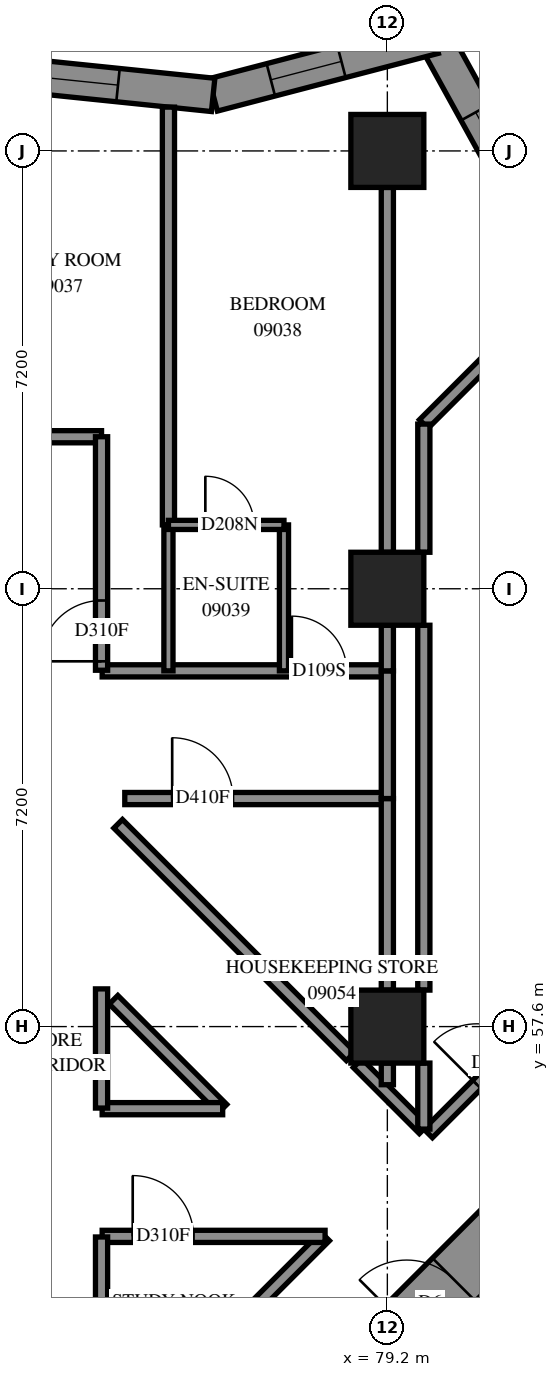
"""IFC4 building model, lengths in metres.
Left out: names, types, materials, properties, quantities, classifications, styles, units other than length and angle.
Written with IfcOpenShell. Run it as: python <this file> out.ifc"""

import sys

from ifc_helpers import new_model, si_unit, direction, frame, frame_2d, origin, origin_2d, place, context, subcontext, project, spatial, polyline, rectangle, outline, extrude, element, fill, save


model = new_model("IFC4")
c1 = context("Model", 3, precision=1e-05, world=origin(), true_north=direction((0.0, 1.0)))
c2 = subcontext(c1, "Body", "Model", "MODEL_VIEW")
j1 = project(units=[si_unit("LENGTHUNIT", "METRE"), si_unit("PLANEANGLEUNIT", "RADIAN")], contexts=[c1])
p1 = place(None, origin())
s1 = spatial("IfcSite", under=j1, at=p1, CompositionType="ELEMENT")
p2 = place(p1, origin())
s2 = spatial("IfcBuilding", under=s1, at=p2, CompositionType="ELEMENT")
p3 = place(p2, frame((0.0, 0.0, 37.2)))
s3 = spatial("IfcBuildingStorey", under=s2, at=p3, CompositionType="ELEMENT", Elevation=37.2)
for number, where, z_axis, x_axis in (
    (1, (79.2, 57.6, 0.0), (0.0, 0.0, 1.0), (1.0, 0.0, 0.0)),
    (2, (79.2, 64.8, 0.0), (0.0, 0.0, 1.0), (1.0, 0.0, 0.0)),
    (3, (79.2, 72.0, 0.0), (0.0, 0.0, 1.0), (1.0, 0.0, 0.0)),
):
    element("IfcColumn", number, at=place(p3, frame(where, z_axis=z_axis, x_axis=x_axis)), inside=s3, PredefinedType="COLUMN", context=c2, shape_type="SweptSolid", body=[
        extrude(rectangle(XDim=1.2, YDim=1.2, at=origin_2d()), origin(), (0.0, 0.0, 1.0), 3.1),
    ])
p4 = place(p3, frame((76.301, 49.443, -0.3), z_axis=(0.0, 0.0, 1.0), x_axis=(0.7071067812, 0.7071067812, 0.0)))
e4 = element("IfcWall", 4, at=p4, inside=s3, PredefinedType="SHEAR", context=c2, shape_type="SweptSolid", body=[
    extrude(rectangle(XDim=14.4, YDim=1.0, at=frame_2d((7.2, 0.0))), origin(), (0.0, 0.0, 1.0), 2.7),
])
p5 = place(p4, frame((4.55, 0.0, 0.3)))
e5 = element("IfcOpeningElement", 5, at=p5, cuts=e4, PredefinedType="OPENING", context=c2, shape_type="SweptSolid", body=[
    extrude(rectangle(XDim=1.1, YDim=2.1, at=frame_2d((0.55, 1.05))), frame((0.0, 0.51, 0.0), z_axis=(0.0, -1.0, 0.0), x_axis=(1.0, 0.0, 0.0)), (0.0, 0.0, 1.0), 1.02),
])
p6 = place(p4, frame((11.35, 0.0, 0.3)))
e6 = element("IfcOpeningElement", 6, at=p6, cuts=e4, PredefinedType="OPENING", context=c2, shape_type="SweptSolid", body=[
    extrude(rectangle(XDim=1.1, YDim=2.1, at=frame_2d((0.55, 1.05))), frame((0.0, 0.51, 0.0), z_axis=(0.0, -1.0, 0.0), x_axis=(1.0, 0.0, 0.0)), (0.0, 0.0, 1.0), 1.02),
])
p7 = place(p3, frame((81.619, 70.883, 0.0), z_axis=(0.0, 0.0, 1.0), x_axis=(-0.4831532481, 0.875535801, 0.0)))
e7 = element("IfcWall", 7, at=p7, inside=s3, PredefinedType="SOLIDWALL", context=c2, shape_type="SweptSolid", body=[
    extrude(outline(polyline([(0.055, -0.275), (3.627, -0.275), (3.199, 0.275), (-0.055, 0.275), (0.055, -0.275)])), origin(), (0.0, 0.0, 1.0), 3.1),
])
p8 = place(p7, frame((0.801, 0.0, 0.5)))
e8 = element("IfcOpeningElement", 8, at=p8, cuts=e7, PredefinedType="OPENING", context=c2, shape_type="SweptSolid", body=[
    extrude(rectangle(XDim=1.2, YDim=2.45, at=frame_2d((0.6, 1.225))), frame((0.0, 0.285, 0.0), z_axis=(0.0, -1.0, 0.0), x_axis=(1.0, 0.0, 0.0)), (0.0, 0.0, 1.0), 0.57),
])
p9 = place(p3, frame((79.97, 73.871, 0.0), z_axis=(0.0, 0.0, 1.0), x_axis=(-0.9675284554, -0.2527621176, 0.0)))
e9 = element("IfcWall", 9, at=p9, inside=s3, PredefinedType="SOLIDWALL", context=c2, shape_type="SweptSolid", body=[
    extrude(outline(polyline([(-0.214, -0.275), (3.707, -0.275), (3.807, 0.275), (0.214, 0.275), (-0.214, -0.275)])), origin(), (0.0, 0.0, 1.0), 3.1),
])
p10 = place(p9, frame((1.576, 0.0, 0.5)))
e10 = element("IfcOpeningElement", 10, at=p10, cuts=e9, PredefinedType="OPENING", context=c2, shape_type="SweptSolid", body=[
    extrude(rectangle(XDim=1.2, YDim=2.45, at=frame_2d((0.6, 1.225))), frame((0.0, 0.285, 0.0), z_axis=(0.0, -1.0, 0.0), x_axis=(1.0, 0.0, 0.0)), (0.0, 0.0, 1.0), 0.57),
])
p11 = place(p3, frame((76.335, 72.921, 0.0), z_axis=(0.0, 0.0, 1.0), x_axis=(-0.9947305582, 0.1025237367, 0.0)))
e11 = element("IfcWall", 11, at=p11, inside=s3, PredefinedType="SOLIDWALL", context=c2, shape_type="SweptSolid", body=[
    extrude(outline(polyline([(0.05, -0.275), (3.864, -0.275), (3.807, 0.275), (-0.05, 0.275), (0.05, -0.275)])), origin(), (0.0, 0.0, 1.0), 3.1),
])
p12 = place(p11, frame((1.573, 0.0, 0.5)))
e12 = element("IfcOpeningElement", 12, at=p12, cuts=e11, PredefinedType="OPENING", context=c2, shape_type="SweptSolid", body=[
    extrude(rectangle(XDim=1.2, YDim=2.45, at=frame_2d((0.6, 1.225))), frame((0.0, 0.285, 0.0), z_axis=(0.0, -1.0, 0.0), x_axis=(1.0, 0.0, 0.0)), (0.0, 0.0, 1.0), 0.57),
])
p13 = place(p3, frame((55.1, 67.3, 0.0), z_axis=(0.0, 0.0, 1.0), x_axis=(1.0, 0.0, 0.0)))
e13 = element("IfcWall", 13, at=p13, inside=s3, PredefinedType="PARTITIONING", context=c2, shape_type="SweptSolid", body=[
    extrude(rectangle(XDim=19.4, YDim=0.2, at=frame_2d((9.7, 0.0))), origin(), (0.0, 0.0, 1.0), 3.1),
])
p14 = place(p13, frame((6.399, 0.0, 0.0)))
e14 = element("IfcOpeningElement", 14, at=p14, cuts=e13, PredefinedType="OPENING", context=c2, shape_type="SweptSolid", body=[
    extrude(rectangle(XDim=0.9, YDim=2.1, at=frame_2d((0.45, 1.05))), frame((0.0, 0.11, 0.0), z_axis=(0.0, -1.0, 0.0), x_axis=(1.0, 0.0, 0.0)), (0.0, 0.0, 1.0), 0.22),
])
p15 = place(p13, frame((13.599, 0.0, 0.0)))
e15 = element("IfcOpeningElement", 15, at=p15, cuts=e13, PredefinedType="OPENING", context=c2, shape_type="SweptSolid", body=[
    extrude(rectangle(XDim=0.9, YDim=2.1, at=frame_2d((0.45, 1.05))), frame((0.0, 0.11, 0.0), z_axis=(0.0, -1.0, 0.0), x_axis=(1.0, 0.0, 0.0)), (0.0, 0.0, 1.0), 0.22),
])
p16 = place(p3, frame((79.871, 55.843, 0.0), z_axis=(0.0, 0.0, 1.0), x_axis=(0.7071067812, 0.7071067812, 0.0)))
e16 = element("IfcWall", 16, at=p16, inside=s3, PredefinedType="PARTITIONING", context=c2, shape_type="SweptSolid", body=[
    extrude(rectangle(XDim=9.85, YDim=0.2, at=frame_2d((4.925, 0.0))), origin(), (0.0, 0.0, 1.0), 3.1),
])
p17 = place(p16, frame((1.135, 0.0, 0.0)))
e17 = element("IfcOpeningElement", 17, at=p17, cuts=e16, PredefinedType="OPENING", context=c2, shape_type="SweptSolid", body=[
    extrude(rectangle(XDim=1.0, YDim=2.1, at=frame_2d((0.5, 1.05))), frame((0.0, 0.11, 0.0), z_axis=(0.0, -1.0, 0.0), x_axis=(1.0, 0.0, 0.0)), (0.0, 0.0, 1.0), 0.22),
])
p18 = place(p3, frame((75.6, 65.85, 0.0), z_axis=(0.0, 0.0, 1.0), x_axis=(0.0, 1.0, 0.0)))
e18 = element("IfcWall", 18, at=p18, inside=s3, PredefinedType="PARTITIONING", context=c2, shape_type="SweptSolid", body=[
    extrude(rectangle(XDim=6.871, YDim=0.2, at=frame_2d((3.435, 0.0))), origin(), (0.0, 0.0, 1.0), 3.1),
])
for number, where, z_axis, x_axis in (
    (19, (79.2, 65.4, 0.0), (0.0, 0.0, 1.0), (0.0, 1.0, 0.0)),
    (20, (79.8, 58.2, 0.0), (0.0, 0.0, 1.0), (0.0, 1.0, 0.0)),
):
    element("IfcWall", number, at=place(p3, frame(where, z_axis=z_axis, x_axis=x_axis)), inside=s3, PredefinedType="PARTITIONING", context=c2, shape_type="SweptSolid", body=[
        extrude(rectangle(XDim=6.0, YDim=0.2, at=frame_2d((3.0, 0.0))), origin(), (0.0, 0.0, 1.0), 3.1),
    ])
p19 = place(p3, frame((74.773, 60.935, 0.0), z_axis=(0.0, 0.0, 1.0), x_axis=(0.7071067812, -0.7071067812, 0.0)))
e21 = element("IfcWall", 21, at=p19, inside=s3, PredefinedType="PARTITIONING", context=c2, shape_type="SweptSolid", body=[
    extrude(rectangle(XDim=5.408, YDim=0.2, at=frame_2d((2.704, 0.0))), origin(), (0.0, 0.0, 1.0), 3.1),
])
p20 = place(p3, frame((74.517, 50.489, 0.0), z_axis=(0.0, 0.0, 1.0), x_axis=(0.7071067812, 0.7071067812, 0.0)))
e22 = element("IfcWall", 22, at=p20, inside=s3, PredefinedType="PARTITIONING", context=c2, shape_type="SweptSolid", body=[
    extrude(rectangle(XDim=5.176, YDim=0.2, at=frame_2d((2.588, 0.0))), origin(), (0.0, 0.0, 1.0), 3.1),
])
p21 = place(p3, frame((74.51, 63.45, 0.0), z_axis=(0.0, 0.0, 1.0), x_axis=(1.0, 0.0, 0.0)))
e23 = element("IfcWall", 23, at=p21, inside=s3, PredefinedType="PARTITIONING", context=c2, shape_type="SweptSolid", body=[
    extrude(rectangle(XDim=4.69, YDim=0.2, at=frame_2d((2.345, 0.0))), origin(), (0.0, 0.0, 1.0), 3.1),
])
p22 = place(p21, frame((3.12, 0.0, 0.0)))
e24 = element("IfcOpeningElement", 24, at=p22, cuts=e23, PredefinedType="OPENING", context=c2, shape_type="SweptSolid", body=[
    extrude(rectangle(XDim=0.9, YDim=2.1, at=frame_2d((0.45, 1.05))), frame((0.0, 0.11, 0.0), z_axis=(0.0, -1.0, 0.0), x_axis=(1.0, 0.0, 0.0)), (0.0, 0.0, 1.0), 0.22),
])
p23 = place(p3, frame((74.882, 61.35, 0.0), z_axis=(0.0, 0.0, 1.0), x_axis=(1.0, 0.0, 0.0)))
e25 = element("IfcWall", 25, at=p23, inside=s3, PredefinedType="PARTITIONING", context=c2, shape_type="SweptSolid", body=[
    extrude(rectangle(XDim=4.318, YDim=0.2, at=frame_2d((2.159, 0.0))), origin(), (0.0, 0.0, 1.0), 3.1),
])
p24 = place(p23, frame((0.78, 0.0, 0.0)))
e26 = element("IfcOpeningElement", 26, at=p24, cuts=e25, PredefinedType="OPENING", context=c2, shape_type="SweptSolid", body=[
    extrude(rectangle(XDim=1.0, YDim=2.1, at=frame_2d((0.5, 1.05))), frame((0.0, 0.11, 0.0), z_axis=(0.0, -1.0, 0.0), x_axis=(1.0, 0.0, 0.0)), (0.0, 0.0, 1.0), 0.22),
])
p25 = place(p3, frame((74.5, 63.46, 0.0), z_axis=(0.0, 0.0, 1.0), x_axis=(0.0, 1.0, 0.0)))
e27 = element("IfcWall", 27, at=p25, inside=s3, PredefinedType="PARTITIONING", context=c2, shape_type="SweptSolid", body=[
    extrude(rectangle(XDim=3.84, YDim=0.2, at=frame_2d((1.92, 0.0))), origin(), (0.0, 0.0, 1.0), 3.1),
])
p26 = place(p25, frame((0.147, 0.0, 0.0)))
e28 = element("IfcOpeningElement", 28, at=p26, cuts=e27, PredefinedType="OPENING", context=c2, shape_type="SweptSolid", body=[
    extrude(rectangle(XDim=1.0, YDim=2.1, at=frame_2d((0.5, 1.05))), frame((0.0, 0.11, 0.0), z_axis=(0.0, -1.0, 0.0), x_axis=(1.0, 0.0, 0.0)), (0.0, 0.0, 1.0), 0.22),
])
p27 = place(p3, frame((74.51, 54.15, 0.0), z_axis=(0.0, 0.0, 1.0), x_axis=(1.0, 0.0, 0.0)))
e29 = element("IfcWall", 29, at=p27, inside=s3, PredefinedType="PARTITIONING", context=c2, shape_type="SweptSolid", body=[
    extrude(rectangle(XDim=3.666, YDim=0.2, at=frame_2d((1.833, 0.0))), origin(), (0.0, 0.0, 1.0), 3.1),
])
p28 = place(p27, frame((0.502, 0.0, 0.0)))
e30 = element("IfcOpeningElement", 30, at=p28, cuts=e29, PredefinedType="OPENING", context=c2, shape_type="SweptSolid", body=[
    extrude(rectangle(XDim=1.0, YDim=2.1, at=frame_2d((0.5, 1.05))), frame((0.0, 0.11, 0.0), z_axis=(0.0, -1.0, 0.0), x_axis=(1.0, 0.0, 0.0)), (0.0, 0.0, 1.0), 0.22),
])
p29 = place(p3, frame((74.5, 50.496, 0.0), z_axis=(0.0, 0.0, 1.0), x_axis=(0.0, 1.0, 0.0)))
e31 = element("IfcWall", 31, at=p29, inside=s3, PredefinedType="PARTITIONING", context=c2, shape_type="SweptSolid", body=[
    extrude(rectangle(XDim=3.644, YDim=0.2, at=frame_2d((1.822, 0.0))), origin(), (0.0, 0.0, 1.0), 3.1),
])
p30 = place(p3, frame((79.799, 67.509, 0.0), z_axis=(0.0, 0.0, 1.0), x_axis=(0.7071067812, 0.7071067812, 0.0)))
e32 = element("IfcWall", 32, at=p30, inside=s3, PredefinedType="PARTITIONING", context=c2, shape_type="SweptSolid", body=[
    extrude(rectangle(XDim=3.521, YDim=0.2, at=frame_2d((1.76, 0.0))), origin(), (0.0, 0.0, 1.0), 3.1),
])
p31 = place(p3, frame((79.2, 58.2, 0.0), z_axis=(0.0, 0.0, 1.0), x_axis=(0.0, 1.0, 0.0)))
e33 = element("IfcWall", 33, at=p31, inside=s3, PredefinedType="PARTITIONING", context=c2, shape_type="SweptSolid", body=[
    extrude(rectangle(XDim=3.15, YDim=0.2, at=frame_2d((1.575, 0.0))), origin(), (0.0, 0.0, 1.0), 3.1),
])
p32 = place(p3, frame((74.697, 58.041, 0.0), z_axis=(0.0, 0.0, 1.0), x_axis=(0.7071067812, -0.7071067812, 0.0)))
e34 = element("IfcWall", 34, at=p32, inside=s3, PredefinedType="PARTITIONING", context=c2, shape_type="SweptSolid", body=[
    extrude(rectangle(XDim=2.534, YDim=0.2, at=frame_2d((1.267, 0.0))), origin(), (0.0, 0.0, 1.0), 3.1),
])
for number, where, z_axis, x_axis in (
    (35, (75.6, 63.45, 0.0), (0.0, 0.0, 1.0), (0.0, 1.0, 0.0)),
    (36, (77.5, 63.45, 0.0), (0.0, 0.0, 1.0), (0.0, 1.0, 0.0)),
):
    element("IfcWall", number, at=place(p3, frame(where, z_axis=z_axis, x_axis=x_axis)), inside=s3, PredefinedType="PARTITIONING", context=c2, shape_type="SweptSolid", body=[
        extrude(rectangle(XDim=2.4, YDim=0.15, at=frame_2d((1.2, 0.0))), origin(), (0.0, 0.0, 1.0), 3.1),
    ])
p33 = place(p3, frame((79.8, 65.4, 0.0), z_axis=(0.0, 0.0, 1.0), x_axis=(0.0, 1.0, 0.0)))
e37 = element("IfcWall", 37, at=p33, inside=s3, PredefinedType="PARTITIONING", context=c2, shape_type="SweptSolid", body=[
    extrude(rectangle(XDim=2.108, YDim=0.2, at=frame_2d((1.054, 0.0))), origin(), (0.0, 0.0, 1.0), 3.1),
])
p34 = place(p3, frame((79.2, 61.35, 0.0), z_axis=(0.0, 0.0, 1.0), x_axis=(0.0, 1.0, 0.0)))
e38 = element("IfcWall", 38, at=p34, inside=s3, PredefinedType="PARTITIONING", context=c2, shape_type="SweptSolid", body=[
    extrude(rectangle(XDim=2.1, YDim=0.2, at=frame_2d((1.05, 0.0))), origin(), (0.0, 0.0, 1.0), 3.1),
])
p35 = place(p3, frame((74.51, 56.25, 0.0), z_axis=(0.0, 0.0, 1.0), x_axis=(1.0, 0.0, 0.0)))
e39 = element("IfcWall", 39, at=p35, inside=s3, PredefinedType="PARTITIONING", context=c2, shape_type="SweptSolid", body=[
    extrude(rectangle(XDim=1.982, YDim=0.2, at=frame_2d((0.991, 0.0))), origin(), (0.0, 0.0, 1.0), 3.1),
])
p36 = place(p3, frame((74.5, 56.26, 0.0), z_axis=(0.0, 0.0, 1.0), x_axis=(0.0, 1.0, 0.0)))
e40 = element("IfcWall", 40, at=p36, inside=s3, PredefinedType="PARTITIONING", context=c2, shape_type="SweptSolid", body=[
    extrude(rectangle(XDim=1.96, YDim=0.2, at=frame_2d((0.98, 0.0))), origin(), (0.0, 0.0, 1.0), 3.1),
])
p37 = place(p3, frame((75.6, 65.85, 0.0), z_axis=(0.0, 0.0, 1.0), x_axis=(1.0, 0.0, 0.0)))
e41 = element("IfcWall", 41, at=p37, inside=s3, PredefinedType="PARTITIONING", context=c2, shape_type="SweptSolid", body=[
    extrude(rectangle(XDim=1.9, YDim=0.15, at=frame_2d((0.95, 0.0))), origin(), (0.0, 0.0, 1.0), 3.1),
])
p38 = place(p37, frame((0.607, 0.0, 0.0)))
e42 = element("IfcOpeningElement", 42, at=p38, cuts=e41, PredefinedType="OPENING", context=c2, shape_type="SweptSolid", body=[
    extrude(rectangle(XDim=0.8, YDim=2.1, at=frame_2d((0.4, 1.05))), frame((0.0, 0.085, 0.0), z_axis=(0.0, -1.0, 0.0), x_axis=(1.0, 0.0, 0.0)), (0.0, 0.0, 1.0), 0.17),
])
p39 = place(p3, frame((78.711, 56.997, 0.0), z_axis=(0.0, 0.0, 1.0), x_axis=(0.7071067812, -0.7071067812, 0.0)))
e43 = element("IfcWall", 43, at=p39, inside=s3, PredefinedType="PARTITIONING", context=c2, shape_type="SweptSolid", body=[
    extrude(rectangle(XDim=1.536, YDim=0.2, at=frame_2d((0.768, 0.0))), origin(), (0.0, 0.0, 1.0), 3.1),
])
p40 = place(p3, frame((79.8, 55.914, 0.0), z_axis=(0.0, 0.0, 1.0), x_axis=(0.0, 1.0, 0.0)))
e44 = element("IfcWall", 44, at=p40, inside=s3, PredefinedType="PARTITIONING", context=c2, shape_type="SweptSolid", body=[
    extrude(rectangle(XDim=1.086, YDim=0.2, at=frame_2d((0.543, 0.0))), origin(), (0.0, 0.0, 1.0), 3.1),
])
p41 = place(p3, frame((79.2, 63.45, 0.0), z_axis=(0.0, 0.0, 1.0), x_axis=(0.0, 1.0, 0.0)))
e45 = element("IfcWall", 45, at=p41, inside=s3, PredefinedType="PARTITIONING", context=c2, shape_type="SweptSolid", body=[
    extrude(rectangle(XDim=0.75, YDim=0.2, at=frame_2d((0.375, 0.0))), origin(), (0.0, 0.0, 1.0), 3.1),
])
p42 = place(p3, frame((79.2, 56.644, 0.0), z_axis=(0.0, 0.0, 1.0), x_axis=(0.0, 1.0, 0.0)))
e46 = element("IfcWall", 46, at=p42, inside=s3, PredefinedType="PARTITIONING", context=c2, shape_type="SweptSolid", body=[
    extrude(rectangle(XDim=0.356, YDim=0.2, at=frame_2d((0.178, 0.0))), origin(), (0.0, 0.0, 1.0), 3.1),
])
p43 = place(p8, origin())
e47 = element("IfcWindow", 47, at=p43, inside=s3, PartitioningType="SINGLE_PANEL", PredefinedType="WINDOW", context=c2, shape_type="SweptSolid", body=[
    extrude(rectangle(XDim=1.2, YDim=2.45, at=frame_2d((0.6, 1.225))), frame((0.0, 0.155, 0.0), z_axis=(0.0, -1.0, 0.0), x_axis=(1.0, 0.0, 0.0)), (0.0, 0.0, 1.0), 0.06),
])
fill(e8, e47)
p44 = place(p10, origin())
e48 = element("IfcWindow", 48, at=p44, inside=s3, PartitioningType="SINGLE_PANEL", PredefinedType="WINDOW", context=c2, shape_type="SweptSolid", body=[
    extrude(rectangle(XDim=1.2, YDim=2.45, at=frame_2d((0.6, 1.225))), frame((0.0, 0.155, 0.0), z_axis=(0.0, -1.0, 0.0), x_axis=(1.0, 0.0, 0.0)), (0.0, 0.0, 1.0), 0.06),
])
fill(e10, e48)
p45 = place(p12, origin())
e49 = element("IfcWindow", 49, at=p45, inside=s3, PartitioningType="SINGLE_PANEL", PredefinedType="WINDOW", context=c2, shape_type="SweptSolid", body=[
    extrude(rectangle(XDim=1.2, YDim=2.45, at=frame_2d((0.6, 1.225))), frame((0.0, 0.155, 0.0), z_axis=(0.0, -1.0, 0.0), x_axis=(1.0, 0.0, 0.0)), (0.0, 0.0, 1.0), 0.06),
])
fill(e12, e49)
p46 = place(p5, origin())
e50 = element("IfcDoor", 50, at=p46, inside=s3, OperationType="DOUBLE_DOOR_SINGLE_SWING", PredefinedType="DOOR", context=c2, shape_type="SweptSolid", body=[
    extrude(rectangle(XDim=1.1, YDim=2.1, at=frame_2d((0.55, 1.05))), frame((0.0, 0.025, 0.0), z_axis=(0.0, -1.0, 0.0), x_axis=(1.0, 0.0, 0.0)), (0.0, 0.0, 1.0), 0.05),
])
fill(e5, e50)
p47 = place(p28, origin())
e51 = element("IfcDoor", 51, at=p47, inside=s3, OperationType="SINGLE_SWING_RIGHT", PredefinedType="DOOR", context=c2, shape_type="SweptSolid", body=[
    extrude(rectangle(XDim=1.0, YDim=2.1, at=frame_2d((0.5, 1.05))), frame((0.0, 0.025, 0.0), z_axis=(0.0, -1.0, 0.0), x_axis=(1.0, 0.0, 0.0)), (0.0, 0.0, 1.0), 0.05),
])
fill(e30, e51)
p48 = place(p26, origin())
e52 = element("IfcDoor", 52, at=p48, inside=s3, OperationType="SINGLE_SWING_RIGHT", PredefinedType="DOOR", context=c2, shape_type="SweptSolid", body=[
    extrude(rectangle(XDim=1.0, YDim=2.1, at=frame_2d((0.5, 1.05))), frame((0.0, 0.025, 0.0), z_axis=(0.0, -1.0, 0.0), x_axis=(1.0, 0.0, 0.0)), (0.0, 0.0, 1.0), 0.05),
])
fill(e28, e52)
p49 = place(p22, origin())
e53 = element("IfcDoor", 53, at=p49, inside=s3, OperationType="SINGLE_SWING_LEFT", PredefinedType="DOOR", context=c2, shape_type="SweptSolid", body=[
    extrude(rectangle(XDim=0.9, YDim=2.1, at=frame_2d((0.45, 1.05))), frame((0.0, 0.025, 0.0), z_axis=(0.0, -1.0, 0.0), x_axis=(1.0, 0.0, 0.0)), (0.0, 0.0, 1.0), 0.05),
])
fill(e24, e53)
p50 = place(p38, origin())
e54 = element("IfcDoor", 54, at=p50, inside=s3, OperationType="SINGLE_SWING_RIGHT", PredefinedType="DOOR", context=c2, shape_type="SweptSolid", body=[
    extrude(rectangle(XDim=0.8, YDim=2.1, at=frame_2d((0.4, 1.05))), frame((0.0, 0.025, 0.0), z_axis=(0.0, -1.0, 0.0), x_axis=(1.0, 0.0, 0.0)), (0.0, 0.0, 1.0), 0.05),
])
fill(e42, e54)
p51 = place(p24, origin())
e55 = element("IfcDoor", 55, at=p51, inside=s3, OperationType="SINGLE_SWING_RIGHT", PredefinedType="DOOR", context=c2, shape_type="SweptSolid", body=[
    extrude(rectangle(XDim=1.0, YDim=2.1, at=frame_2d((0.5, 1.05))), frame((0.0, 0.025, 0.0), z_axis=(0.0, -1.0, 0.0), x_axis=(1.0, 0.0, 0.0)), (0.0, 0.0, 1.0), 0.05),
])
fill(e26, e55)
p52 = place(p17, origin())
e56 = element("IfcDoor", 56, at=p52, inside=s3, OperationType="SINGLE_SWING_RIGHT", PredefinedType="DOOR", context=c2, shape_type="SweptSolid", body=[
    extrude(rectangle(XDim=1.0, YDim=2.1, at=frame_2d((0.5, 1.05))), frame((0.0, 0.025, 0.0), z_axis=(0.0, -1.0, 0.0), x_axis=(1.0, 0.0, 0.0)), (0.0, 0.0, 1.0), 0.05),
])
fill(e17, e56)
save(model, sys.argv[1])
